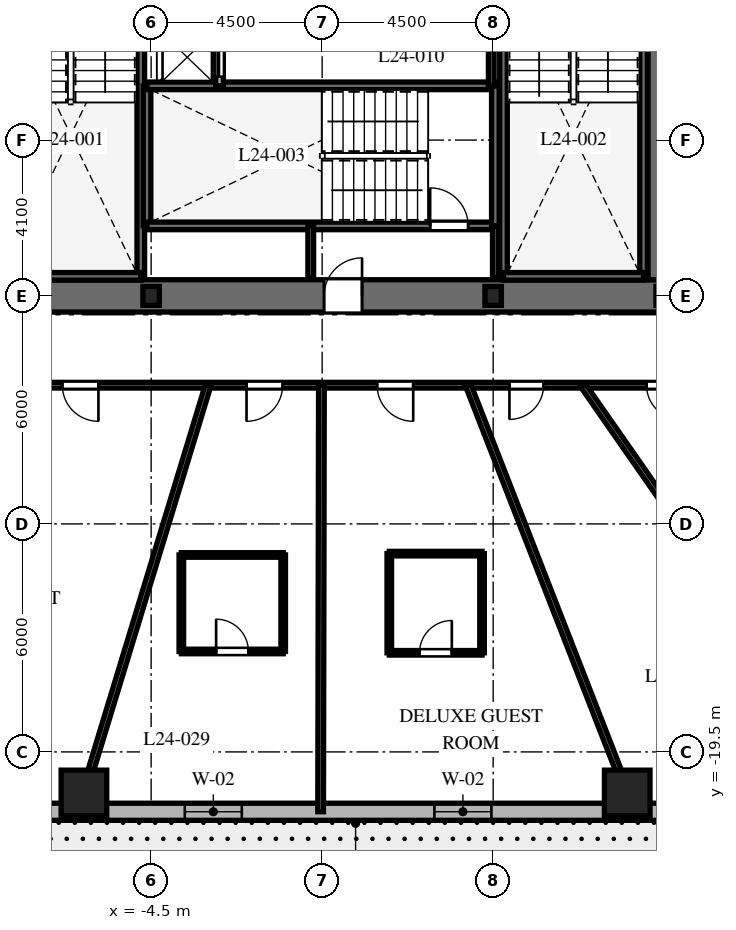
"""IFC4 building model, lengths in metres.
Left out: names, types, materials, properties, quantities, classifications, styles, units other than length and angle.
Written with IfcOpenShell. Run it as: python <this file> out.ifc"""

import sys

from ifc_helpers import new_model, si_unit, direction, frame, frame_2d, origin, origin_2d, place, context, subcontext, project, spatial, rectangle, i_section, extrude, element, fill, save


model = new_model("IFC4")
c1 = context("Model", 3, precision=1e-05, world=origin(), true_north=direction((0.0, 1.0)))
c2 = subcontext(c1, "Body", "Model", "MODEL_VIEW")
j1 = project(units=[si_unit("LENGTHUNIT", "METRE"), si_unit("PLANEANGLEUNIT", "RADIAN")], contexts=[c1])
p1 = place(None, origin())
s1 = spatial("IfcSite", under=j1, at=p1, CompositionType="ELEMENT")
p2 = place(p1, origin())
s2 = spatial("IfcBuilding", under=s1, at=p2, CompositionType="ELEMENT")
p3 = place(p2, frame((0.0, 0.0, 102.5)))
s3 = spatial("IfcBuildingStorey", under=s2, at=p3, CompositionType="ELEMENT", Elevation=102.5)
p4 = place(p3, frame((-9.425, -7.5, 0.0), z_axis=(0.0, 0.0, 1.0), x_axis=(1.0, 0.0, 0.0)))
e1 = element("IfcWall", 1, at=p4, inside=s3, PredefinedType="SHEAR", context=c2, shape_type="SweptSolid", body=[
    extrude(rectangle(XDim=18.85, YDim=0.85, at=frame_2d((9.425, 0.0))), origin(), (0.0, 0.0, 1.0), 3.7),
])
p5 = place(p4, frame((9.475, 0.0, 0.0)))
e2 = element("IfcOpeningElement", 2, at=p5, cuts=e1, PredefinedType="OPENING", context=c2, shape_type="SweptSolid", body=[
    extrude(rectangle(XDim=1.0, YDim=2.15, at=frame_2d((0.5, 1.075))), frame((0.0, 0.435, 0.0), z_axis=(0.0, -1.0, 0.0), x_axis=(1.0, 0.0, 0.0)), (0.0, 0.0, 1.0), 0.87),
])
p6 = place(p3, frame((9.0, -7.075, 0.0), z_axis=(0.0, 0.0, 1.0), x_axis=(0.0, 1.0, 0.0)))
e3 = element("IfcWall", 3, at=p6, inside=s3, PredefinedType="SHEAR", context=c2, shape_type="SweptSolid", body=[
    extrude(rectangle(XDim=14.15, YDim=0.85, at=frame_2d((7.075, 0.0))), origin(), (0.0, 0.0, 1.0), 3.7),
])
p7 = place(p6, frame((10.2, 0.0, 0.0)))
e4 = element("IfcOpeningElement", 4, at=p7, cuts=e3, PredefinedType="OPENING", context=c2, shape_type="SweptSolid", body=[
    extrude(rectangle(XDim=1.05, YDim=2.15, at=frame_2d((0.525, 1.075))), frame((0.0, 0.435, 0.0), z_axis=(0.0, -1.0, 0.0), x_axis=(1.0, 0.0, 0.0)), (0.0, 0.0, 1.0), 0.87),
])
p8 = place(p3, frame((-4.772, -6.985, 0.0), z_axis=(0.0, 0.0, 1.0), x_axis=(0.0, 1.0, 0.0)))
e5 = element("IfcWall", 5, at=p8, inside=s3, PredefinedType="SHEAR", context=c2, shape_type="SweptSolid", body=[
    extrude(rectangle(XDim=9.143, YDim=0.2, at=frame_2d((4.572, 0.0))), origin(), (0.0, 0.0, 1.0), 3.7),
])
p9 = place(p3, frame((-8.458, -6.985, 0.0), z_axis=(0.0, 0.0, 1.0), x_axis=(1.0, 0.0, 0.0)))
e6 = element("IfcWall", 6, at=p9, inside=s3, PredefinedType="SHEAR", context=c2, shape_type="SweptSolid", body=[
    extrude(rectangle(XDim=3.686, YDim=0.2, at=frame_2d((1.843, 0.0))), origin(), (0.0, 0.0, 1.0), 3.7),
])
for number, where, z_axis, x_axis in (
    (7, (4.772, -6.985, 0.0), (0.0, 0.0, 1.0), (0.0, 1.0, 0.0)),
    (8, (8.458, -6.985, 0.0), (0.0, 0.0, 1.0), (0.0, 1.0, 0.0)),
):
    element("IfcWall", number, at=place(p3, frame(where, z_axis=z_axis, x_axis=x_axis)), inside=s3, PredefinedType="SHEAR", context=c2, shape_type="SweptSolid", body=[
        extrude(rectangle(XDim=9.143, YDim=0.2, at=frame_2d((4.572, 0.0))), origin(), (0.0, 0.0, 1.0), 3.7),
    ])
for number, where, z_axis, x_axis in (
    (9, (4.772, -6.985, 0.0), (0.0, 0.0, 1.0), (1.0, 0.0, 0.0)),
    (10, (-4.608, -5.658, 0.0), (0.0, 0.0, 1.0), (0.0, 1.0, 0.0)),
):
    element("IfcWall", number, at=place(p3, frame(where, z_axis=z_axis, x_axis=x_axis)), inside=s3, PredefinedType="SHEAR", context=c2, shape_type="SweptSolid", body=[
        extrude(rectangle(XDim=3.686, YDim=0.2, at=frame_2d((1.843, 0.0))), origin(), (0.0, 0.0, 1.0), 3.7),
    ])
p10 = place(p3, frame((-4.608, -5.658, 0.0), z_axis=(0.0, 0.0, 1.0), x_axis=(1.0, 0.0, 0.0)))
e11 = element("IfcWall", 11, at=p10, inside=s3, PredefinedType="SHEAR", context=c2, shape_type="SweptSolid", body=[
    extrude(rectangle(XDim=9.166, YDim=0.2, at=frame_2d((4.583, 0.0))), origin(), (0.0, 0.0, 1.0), 3.7),
])
p11 = place(p10, frame((7.45, 0.0, 0.0)))
e12 = element("IfcOpeningElement", 12, at=p11, cuts=e11, PredefinedType="OPENING", context=c2, shape_type="SweptSolid", body=[
    extrude(rectangle(XDim=1.0, YDim=2.15, at=frame_2d((0.5, 1.075))), frame((0.0, 0.11, 0.0), z_axis=(0.0, -1.0, 0.0), x_axis=(1.0, 0.0, 0.0)), (0.0, 0.0, 1.0), 0.22),
])
p12 = place(p3, frame((-4.608, -1.972, 0.0), z_axis=(0.0, 0.0, 1.0), x_axis=(1.0, 0.0, 0.0)))
e13 = element("IfcWall", 13, at=p12, inside=s3, PredefinedType="SHEAR", context=c2, shape_type="SweptSolid", body=[
    extrude(rectangle(XDim=9.166, YDim=0.2, at=frame_2d((4.583, 0.0))), origin(), (0.0, 0.0, 1.0), 3.7),
])
p13 = place(p3, frame((4.558, -5.658, 0.0), z_axis=(0.0, 0.0, 1.0), x_axis=(0.0, 1.0, 0.0)))
e14 = element("IfcWall", 14, at=p13, inside=s3, PredefinedType="SHEAR", context=c2, shape_type="SweptSolid", body=[
    extrude(rectangle(XDim=3.686, YDim=0.2, at=frame_2d((1.843, 0.0))), origin(), (0.0, 0.0, 1.0), 3.7),
])
for number, where, z_axis, x_axis in (
    (15, (-4.5, -7.5, 0.0), (0.0, 0.0, 1.0), (1.0, 0.0, 0.0)),
    (16, (4.5, -7.5, 0.0), (0.0, 0.0, 1.0), (1.0, 0.0, 0.0)),
    (17, (9.0, -7.5, 0.0), (0.0, 0.0, 1.0), (1.0, 0.0, 0.0)),
):
    element("IfcColumn", number, at=place(p3, frame(where, z_axis=z_axis, x_axis=x_axis)), inside=s3, PredefinedType="COLUMN", context=c2, shape_type="SweptSolid", body=[
        extrude(i_section(OverallWidth=0.432, OverallDepth=0.498, WebThickness=0.056, FlangeThickness=0.089, at=origin_2d()), origin(), (0.0, 0.0, 1.0), 3.7),
    ])
for number, where, z_axis, x_axis in (
    (18, (-6.268, -20.58, 0.0), (0.0, 0.0, 1.0), (1.0, 0.0, 0.0)),
    (19, (8.028, -20.58, 0.0), (0.0, 0.0, 1.0), (1.0, 0.0, 0.0)),
):
    element("IfcColumn", number, at=place(p3, frame(where, z_axis=z_axis, x_axis=x_axis)), inside=s3, PredefinedType="COLUMN", context=c2, shape_type="SweptSolid", body=[
        extrude(rectangle(XDim=1.2, YDim=1.2, at=origin_2d()), origin(), (0.0, 0.0, 1.0), 3.7),
    ])
p14 = place(p3, frame((-11.012, -21.075, 0.0), z_axis=(0.0, 0.0, 1.0), x_axis=(1.0, 0.0, 0.0)))
e20 = element("IfcWall", 20, at=p14, inside=s3, PredefinedType="SOLIDWALL", context=c2, shape_type="SweptSolid", body=[
    extrude(rectangle(XDim=23.782, YDim=0.45, at=frame_2d((11.891, 0.0))), origin(), (0.0, 0.0, 1.0), 3.4),
])
p15 = place(p14, frame((2.473, 0.0, 0.0)))
e21 = element("IfcOpeningElement", 21, at=p15, cuts=e20, PredefinedType="OPENING", context=c2, shape_type="SweptSolid", body=[
    extrude(rectangle(XDim=1.0, YDim=2.15, at=frame_2d((0.5, 1.075))), frame((0.0, 0.235, 0.0), z_axis=(0.0, -1.0, 0.0), x_axis=(1.0, 0.0, 0.0)), (0.0, 0.0, 1.0), 0.47),
])
p16 = place(p14, frame((7.398, 0.0, 0.8)))
e22 = element("IfcOpeningElement", 22, at=p16, cuts=e20, PredefinedType="OPENING", context=c2, shape_type="SweptSolid", body=[
    extrude(rectangle(XDim=1.5, YDim=1.8, at=frame_2d((0.75, 0.9))), frame((0.0, 0.235, 0.0), z_axis=(0.0, -1.0, 0.0), x_axis=(1.0, 0.0, 0.0)), (0.0, 0.0, 1.0), 0.47),
])
p17 = place(p14, frame((13.966, 0.0, 0.8)))
e23 = element("IfcOpeningElement", 23, at=p17, cuts=e20, PredefinedType="OPENING", context=c2, shape_type="SweptSolid", body=[
    extrude(rectangle(XDim=1.5, YDim=1.8, at=frame_2d((0.75, 0.9))), frame((0.0, 0.235, 0.0), z_axis=(0.0, -1.0, 0.0), x_axis=(1.0, 0.0, 0.0)), (0.0, 0.0, 1.0), 0.47),
])
p18 = place(p14, frame((20.741, 0.0, 0.8)))
e24 = element("IfcOpeningElement", 24, at=p18, cuts=e20, PredefinedType="OPENING", context=c2, shape_type="SweptSolid", body=[
    extrude(rectangle(XDim=1.5, YDim=1.8, at=frame_2d((0.75, 0.9))), frame((0.0, 0.235, 0.0), z_axis=(0.0, -1.0, 0.0), x_axis=(1.0, 0.0, 0.0)), (0.0, 0.0, 1.0), 0.47),
])
for number, where, z_axis, x_axis in (
    (25, (-0.3, -7.02, 0.0), (0.0, 0.0, 1.0), (0.0, 1.0, 0.0)),
    (26, (4.558, -7.02, 0.0), (0.0, 0.0, 1.0), (0.0, 1.0, 0.0)),
):
    element("IfcWall", number, at=place(p3, frame(where, z_axis=z_axis, x_axis=x_axis)), inside=s3, PredefinedType="PARTITIONING", context=c2, shape_type="SweptSolid", body=[
        extrude(rectangle(XDim=1.362, YDim=0.15, at=frame_2d((0.681, 0.0))), origin(), (0.0, 0.0, 1.0), 3.4),
    ])
p19 = place(p3, frame((-2.7, -1.972, 0.0), z_axis=(0.0, 0.0, 1.0), x_axis=(0.0, 1.0, 0.0)))
e27 = element("IfcWall", 27, at=p19, inside=s3, PredefinedType="PARTITIONING", context=c2, shape_type="SweptSolid", body=[
    extrude(rectangle(XDim=1.472, YDim=0.2, at=frame_2d((0.736, 0.0))), origin(), (0.0, 0.0, 1.0), 3.4),
])
p20 = place(p19, frame((0.24, 0.0, 0.0)))
e28 = element("IfcOpeningElement", 28, at=p20, cuts=e27, PredefinedType="OPENING", context=c2, shape_type="SweptSolid", body=[
    extrude(rectangle(XDim=1.0, YDim=2.2, at=frame_2d((0.5, 1.1))), frame((0.0, 0.11, 0.0), z_axis=(0.0, -1.0, 0.0), x_axis=(1.0, 0.0, 0.0)), (0.0, 0.0, 1.0), 0.22),
])
p21 = place(p3, frame((4.45, -1.972, 0.0), z_axis=(0.0, 0.0, 1.0), x_axis=(0.0, 1.0, 0.0)))
e29 = element("IfcWall", 29, at=p21, inside=s3, PredefinedType="PARTITIONING", context=c2, shape_type="SweptSolid", body=[
    extrude(rectangle(XDim=4.222, YDim=0.15, at=frame_2d((2.111, 0.0))), origin(), (0.0, 0.0, 1.0), 3.4),
])
p22 = place(p3, frame((11.35, -9.85, 0.0), z_axis=(0.0, 0.0, 1.0), x_axis=(-1.0, 0.0, 0.0)))
e30 = element("IfcWall", 30, at=p22, inside=s3, PredefinedType="PARTITIONING", context=c2, shape_type="SweptSolid", body=[
    extrude(rectangle(XDim=22.7, YDim=0.15, at=frame_2d((11.35, 0.0))), origin(), (0.0, 0.0, 1.0), 2.84),
])
p23 = place(p22, frame((17.237, 0.0, 0.0)))
e31 = element("IfcOpeningElement", 31, at=p23, cuts=e30, PredefinedType="OPENING", context=c2, shape_type="SweptSolid", body=[
    extrude(rectangle(XDim=0.95, YDim=2.03, at=frame_2d((0.475, 1.015))), frame((0.0, 0.085, 0.0), z_axis=(0.0, -1.0, 0.0), x_axis=(1.0, 0.0, 0.0)), (0.0, 0.0, 1.0), 0.17),
])
p24 = place(p22, frame((12.39, 0.0, 0.0)))
e32 = element("IfcOpeningElement", 32, at=p24, cuts=e30, PredefinedType="OPENING", context=c2, shape_type="SweptSolid", body=[
    extrude(rectangle(XDim=0.95, YDim=2.03, at=frame_2d((0.475, 1.015))), frame((0.0, 0.085, 0.0), z_axis=(0.0, -1.0, 0.0), x_axis=(1.0, 0.0, 0.0)), (0.0, 0.0, 1.0), 0.17),
])
p25 = place(p22, frame((8.954, 0.0, 0.0)))
e33 = element("IfcOpeningElement", 33, at=p25, cuts=e30, PredefinedType="OPENING", context=c2, shape_type="SweptSolid", body=[
    extrude(rectangle(XDim=0.95, YDim=2.03, at=frame_2d((0.475, 1.015))), frame((0.0, 0.085, 0.0), z_axis=(0.0, -1.0, 0.0), x_axis=(1.0, 0.0, 0.0)), (0.0, 0.0, 1.0), 0.17),
])
p26 = place(p22, frame((5.522, 0.0, 0.0)))
e34 = element("IfcOpeningElement", 34, at=p26, cuts=e30, PredefinedType="OPENING", context=c2, shape_type="SweptSolid", body=[
    extrude(rectangle(XDim=0.9, YDim=2.03, at=frame_2d((0.45, 1.015))), frame((0.0, 0.085, 0.0), z_axis=(0.0, -1.0, 0.0), x_axis=(1.0, 0.0, 0.0)), (0.0, 0.0, 1.0), 0.17),
])
p27 = place(p22, frame((1.914, 0.0, 0.0)))
e35 = element("IfcOpeningElement", 35, at=p27, cuts=e30, PredefinedType="OPENING", context=c2, shape_type="SweptSolid", body=[
    extrude(rectangle(XDim=0.9, YDim=2.03, at=frame_2d((0.45, 1.015))), frame((0.0, 0.085, 0.0), z_axis=(0.0, -1.0, 0.0), x_axis=(1.0, 0.0, 0.0)), (0.0, 0.0, 1.0), 0.17),
])
p28 = place(p3, frame((-3.0, -9.85, 0.0), z_axis=(0.0, 0.0, 1.0), x_axis=(-0.291352035382, -0.95661590593, 0.0)))
e36 = element("IfcWall", 36, at=p28, inside=s3, PredefinedType="PARTITIONING", context=c2, shape_type="SweptSolid", body=[
    extrude(rectangle(XDim=11.734, YDim=0.15, at=frame_2d((5.867, 0.0))), origin(), (0.0, 0.0, 1.0), 2.54),
])
p29 = place(p3, frame((-0.019, -9.85, 0.0), z_axis=(0.0, 0.0, 1.0), x_axis=(-0.001913996973, -0.999998168306, 0.0)))
e37 = element("IfcWall", 37, at=p29, inside=s3, PredefinedType="PARTITIONING", context=c2, shape_type="SweptSolid", body=[
    extrude(rectangle(XDim=11.225, YDim=0.15, at=frame_2d((5.612, 0.0))), origin(), (0.0, 0.0, 1.0), 2.54),
])
p30 = place(p3, frame((3.842, -9.85, 0.0), z_axis=(0.0, 0.0, 1.0), x_axis=(0.363432685593, -0.931620460833, 0.0)))
e38 = element("IfcWall", 38, at=p30, inside=s3, PredefinedType="PARTITIONING", context=c2, shape_type="SweptSolid", body=[
    extrude(rectangle(XDim=12.049, YDim=0.15, at=frame_2d((6.024, 0.0))), origin(), (0.0, 0.0, 1.0), 2.54),
])
p31 = place(p3, frame((6.861, -9.85, 0.0), z_axis=(0.0, 0.0, 1.0), x_axis=(0.571575431292, -0.820549527051, 0.0)))
e39 = element("IfcWall", 39, at=p31, inside=s3, PredefinedType="PARTITIONING", context=c2, shape_type="SweptSolid", body=[
    extrude(rectangle(XDim=12.975, YDim=0.15, at=frame_2d((6.488, 0.0))), origin(), (0.0, 0.0, 1.0), 2.54),
])
p32 = place(p3, frame((-3.705, -16.857, 0.0), z_axis=(0.0, 0.0, 1.0), x_axis=(1.0, 0.0, 0.0)))
e40 = element("IfcWall", 40, at=p32, inside=s3, PredefinedType="PARTITIONING", context=c2, shape_type="SweptSolid", body=[
    extrude(rectangle(XDim=2.68, YDim=0.12, at=frame_2d((1.34, 0.0))), origin(), (0.0, 0.0, 1.0), 3.4),
])
p33 = place(p32, frame((0.915, 0.0, 0.0)))
e41 = element("IfcOpeningElement", 41, at=p33, cuts=e40, PredefinedType="OPENING", context=c2, shape_type="SweptSolid", body=[
    extrude(rectangle(XDim=0.85, YDim=2.03, at=frame_2d((0.425, 1.015))), frame((0.0, 0.07, 0.0), z_axis=(0.0, -1.0, 0.0), x_axis=(1.0, 0.0, 0.0)), (0.0, 0.0, 1.0), 0.14),
])
p34 = place(p3, frame((-1.025, -16.857, 0.0), z_axis=(0.0, 0.0, 1.0), x_axis=(0.0, 1.0, 0.0)))
e42 = element("IfcWall", 42, at=p34, inside=s3, PredefinedType="PARTITIONING", context=c2, shape_type="SweptSolid", body=[
    extrude(rectangle(XDim=2.54, YDim=0.12, at=frame_2d((1.27, 0.0))), origin(), (0.0, 0.0, 1.0), 2.84),
])
p35 = place(p3, frame((-1.025, -14.317, 0.0), z_axis=(0.0, 0.0, 1.0), x_axis=(-1.0, 0.0, 0.0)))
e43 = element("IfcWall", 43, at=p35, inside=s3, PredefinedType="PARTITIONING", context=c2, shape_type="SweptSolid", body=[
    extrude(rectangle(XDim=2.68, YDim=0.12, at=frame_2d((1.34, 0.0))), origin(), (0.0, 0.0, 1.0), 3.4),
])
p36 = place(p3, frame((-3.705, -14.317, 0.0), z_axis=(0.0, 0.0, 1.0), x_axis=(0.0, -1.0, 0.0)))
e44 = element("IfcWall", 44, at=p36, inside=s3, PredefinedType="PARTITIONING", context=c2, shape_type="SweptSolid", body=[
    extrude(rectangle(XDim=2.54, YDim=0.12, at=frame_2d((1.27, 0.0))), origin(), (0.0, 0.0, 1.0), 2.84),
])
p37 = place(p3, frame((1.767, -16.892, 0.0), z_axis=(0.0, 0.0, 1.0), x_axis=(1.0, 0.0, 0.0)))
e45 = element("IfcWall", 45, at=p37, inside=s3, PredefinedType="PARTITIONING", context=c2, shape_type="SweptSolid", body=[
    extrude(rectangle(XDim=2.44, YDim=0.12, at=frame_2d((1.22, 0.0))), origin(), (0.0, 0.0, 1.0), 3.4),
])
p38 = place(p37, frame((0.795, 0.0, 0.0)))
e46 = element("IfcOpeningElement", 46, at=p38, cuts=e45, PredefinedType="OPENING", context=c2, shape_type="SweptSolid", body=[
    extrude(rectangle(XDim=0.85, YDim=2.03, at=frame_2d((0.425, 1.015))), frame((0.0, 0.07, 0.0), z_axis=(0.0, -1.0, 0.0), x_axis=(1.0, 0.0, 0.0)), (0.0, 0.0, 1.0), 0.14),
])
p39 = place(p3, frame((4.207, -16.892, 0.0), z_axis=(0.0, 0.0, 1.0), x_axis=(0.0, 1.0, 0.0)))
e47 = element("IfcWall", 47, at=p39, inside=s3, PredefinedType="PARTITIONING", context=c2, shape_type="SweptSolid", body=[
    extrude(rectangle(XDim=2.61, YDim=0.12, at=frame_2d((1.305, 0.0))), origin(), (0.0, 0.0, 1.0), 2.84),
])
p40 = place(p3, frame((4.207, -14.282, 0.0), z_axis=(0.0, 0.0, 1.0), x_axis=(-1.0, 0.0, 0.0)))
e48 = element("IfcWall", 48, at=p40, inside=s3, PredefinedType="PARTITIONING", context=c2, shape_type="SweptSolid", body=[
    extrude(rectangle(XDim=2.44, YDim=0.12, at=frame_2d((1.22, 0.0))), origin(), (0.0, 0.0, 1.0), 3.4),
])
p41 = place(p3, frame((1.767, -14.282, 0.0), z_axis=(0.0, 0.0, 1.0), x_axis=(0.0, -1.0, 0.0)))
e49 = element("IfcWall", 49, at=p41, inside=s3, PredefinedType="PARTITIONING", context=c2, shape_type="SweptSolid", body=[
    extrude(rectangle(XDim=2.61, YDim=0.12, at=frame_2d((1.305, 0.0))), origin(), (0.0, 0.0, 1.0), 2.84),
])
p42 = place(p16, origin())
e50 = element("IfcWindow", 50, at=p42, inside=s3, PartitioningType="SINGLE_PANEL", PredefinedType="WINDOW", context=c2, shape_type="SweptSolid", body=[
    extrude(rectangle(XDim=1.5, YDim=1.8, at=frame_2d((0.75, 0.9))), frame((0.0, 0.03, 0.0), z_axis=(0.0, -1.0, 0.0), x_axis=(1.0, 0.0, 0.0)), (0.0, 0.0, 1.0), 0.06),
])
fill(e22, e50)
p43 = place(p17, origin())
e51 = element("IfcWindow", 51, at=p43, inside=s3, PartitioningType="SINGLE_PANEL", PredefinedType="WINDOW", context=c2, shape_type="SweptSolid", body=[
    extrude(rectangle(XDim=1.5, YDim=1.8, at=frame_2d((0.75, 0.9))), frame((0.0, 0.03, 0.0), z_axis=(0.0, -1.0, 0.0), x_axis=(1.0, 0.0, 0.0)), (0.0, 0.0, 1.0), 0.06),
])
fill(e23, e51)
p44 = place(p11, origin())
e52 = element("IfcDoor", 52, at=p44, inside=s3, OperationType="SINGLE_SWING_LEFT", PredefinedType="DOOR", context=c2, shape_type="SweptSolid", body=[
    extrude(rectangle(XDim=1.0, YDim=2.15, at=frame_2d((0.5, 1.075))), frame((0.0, 0.025, 0.0), z_axis=(0.0, -1.0, 0.0), x_axis=(1.0, 0.0, 0.0)), (0.0, 0.0, 1.0), 0.05),
])
fill(e12, e52)
p45 = place(p5, origin())
e53 = element("IfcDoor", 53, at=p45, inside=s3, OperationType="SINGLE_SWING_RIGHT", PredefinedType="DOOR", context=c2, shape_type="SweptSolid", body=[
    extrude(rectangle(XDim=1.0, YDim=2.15, at=frame_2d((0.5, 1.075))), frame((0.0, 0.025, 0.0), z_axis=(0.0, -1.0, 0.0), x_axis=(1.0, 0.0, 0.0)), (0.0, 0.0, 1.0), 0.05),
])
fill(e2, e53)
p46 = place(p20, origin())
e54 = element("IfcDoor", 54, at=p46, inside=s3, OperationType="SLIDING_TO_LEFT", PredefinedType="DOOR", context=c2, shape_type="SweptSolid", body=[
    extrude(rectangle(XDim=1.0, YDim=2.2, at=frame_2d((0.5, 1.1))), frame((0.0, 0.025, 0.0), z_axis=(0.0, -1.0, 0.0), x_axis=(1.0, 0.0, 0.0)), (0.0, 0.0, 1.0), 0.05),
])
fill(e28, e54)
p47 = place(p23, origin())
e55 = element("IfcDoor", 55, at=p47, inside=s3, OperationType="SINGLE_SWING_LEFT", PredefinedType="DOOR", context=c2, shape_type="SweptSolid", body=[
    extrude(rectangle(XDim=0.95, YDim=2.03, at=frame_2d((0.475, 1.015))), frame((0.0, 0.025, 0.0), z_axis=(0.0, -1.0, 0.0), x_axis=(1.0, 0.0, 0.0)), (0.0, 0.0, 1.0), 0.05),
])
fill(e31, e55)
p48 = place(p24, origin())
e56 = element("IfcDoor", 56, at=p48, inside=s3, OperationType="SINGLE_SWING_RIGHT", PredefinedType="DOOR", context=c2, shape_type="SweptSolid", body=[
    extrude(rectangle(XDim=0.95, YDim=2.03, at=frame_2d((0.475, 1.015))), frame((0.0, 0.025, 0.0), z_axis=(0.0, -1.0, 0.0), x_axis=(1.0, 0.0, 0.0)), (0.0, 0.0, 1.0), 0.05),
])
fill(e32, e56)
p49 = place(p33, origin())
e57 = element("IfcDoor", 57, at=p49, inside=s3, OperationType="SINGLE_SWING_LEFT", PredefinedType="DOOR", context=c2, shape_type="SweptSolid", body=[
    extrude(rectangle(XDim=0.85, YDim=2.03, at=frame_2d((0.425, 1.015))), frame((0.0, 0.025, 0.0), z_axis=(0.0, -1.0, 0.0), x_axis=(1.0, 0.0, 0.0)), (0.0, 0.0, 1.0), 0.05),
])
fill(e41, e57)
p50 = place(p25, origin())
e58 = element("IfcDoor", 58, at=p50, inside=s3, OperationType="SINGLE_SWING_LEFT", PredefinedType="DOOR", context=c2, shape_type="SweptSolid", body=[
    extrude(rectangle(XDim=0.95, YDim=2.03, at=frame_2d((0.475, 1.015))), frame((0.0, 0.025, 0.0), z_axis=(0.0, -1.0, 0.0), x_axis=(1.0, 0.0, 0.0)), (0.0, 0.0, 1.0), 0.05),
])
fill(e33, e58)
p51 = place(p38, origin())
e59 = element("IfcDoor", 59, at=p51, inside=s3, OperationType="SINGLE_SWING_RIGHT", PredefinedType="DOOR", context=c2, shape_type="SweptSolid", body=[
    extrude(rectangle(XDim=0.85, YDim=2.03, at=frame_2d((0.425, 1.015))), frame((0.0, 0.025, 0.0), z_axis=(0.0, -1.0, 0.0), x_axis=(1.0, 0.0, 0.0)), (0.0, 0.0, 1.0), 0.05),
])
fill(e46, e59)
p52 = place(p26, origin())
e60 = element("IfcDoor", 60, at=p52, inside=s3, OperationType="SINGLE_SWING_RIGHT", PredefinedType="DOOR", context=c2, shape_type="SweptSolid", body=[
    extrude(rectangle(XDim=0.9, YDim=2.03, at=frame_2d((0.45, 1.015))), frame((0.0, 0.025, 0.0), z_axis=(0.0, -1.0, 0.0), x_axis=(1.0, 0.0, 0.0)), (0.0, 0.0, 1.0), 0.05),
])
fill(e34, e60)
p53 = place(p27, origin())
e61 = element("IfcDoor", 61, at=p53, inside=s3, OperationType="SINGLE_SWING_LEFT", PredefinedType="DOOR", context=c2, shape_type="SweptSolid", body=[
    extrude(rectangle(XDim=0.9, YDim=2.03, at=frame_2d((0.45, 1.015))), frame((0.0, 0.025, 0.0), z_axis=(0.0, -1.0, 0.0), x_axis=(1.0, 0.0, 0.0)), (0.0, 0.0, 1.0), 0.05),
])
fill(e35, e61)
save(model, sys.argv[1])
